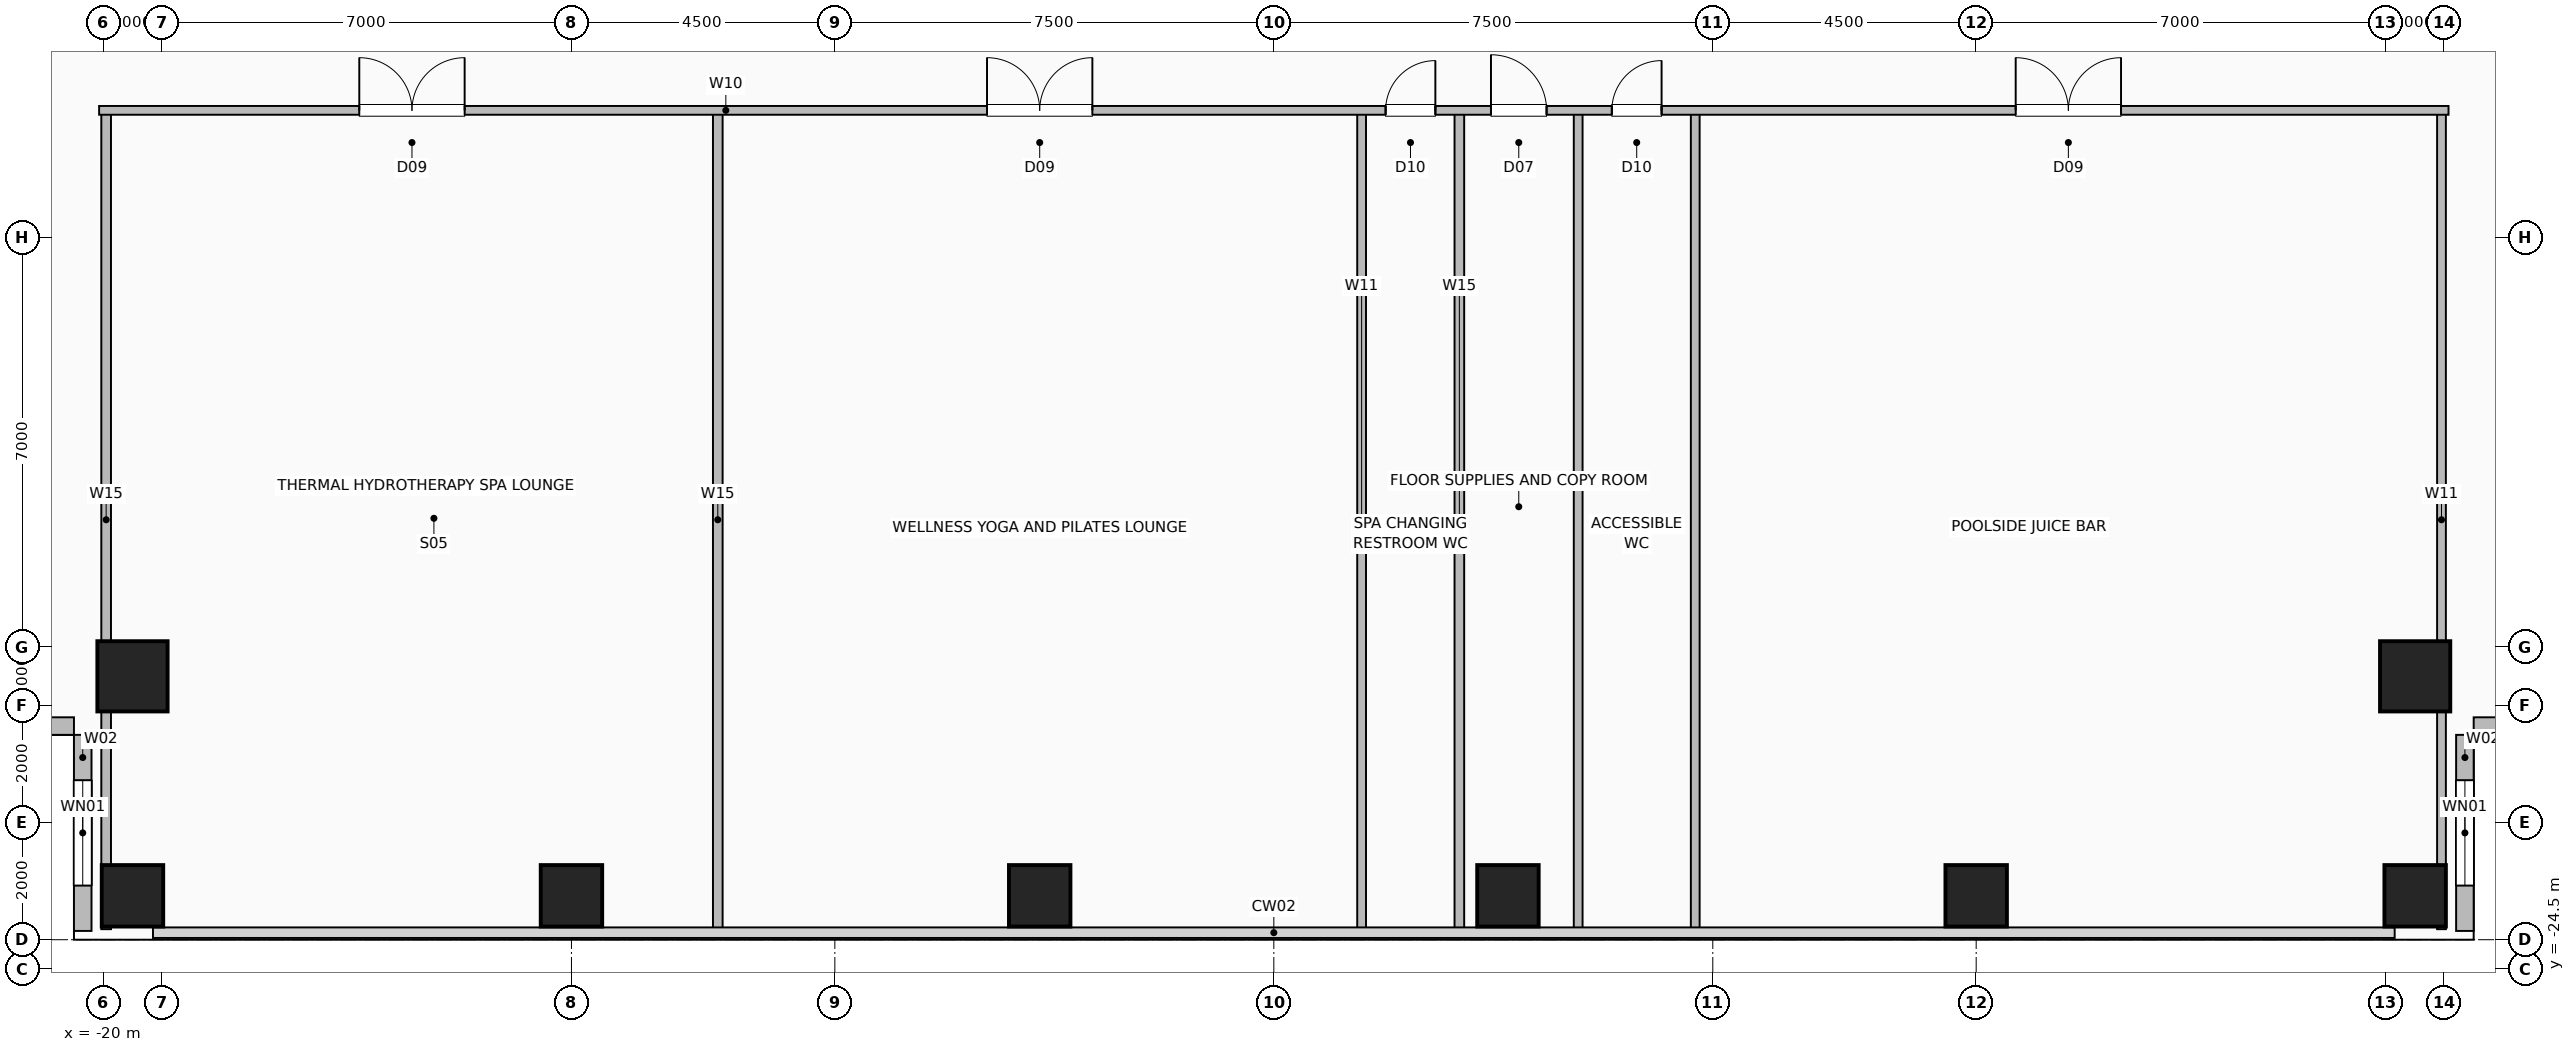
"""IFC4 building model, lengths in metres.
Left out: names, types, materials, properties, quantities, classifications, styles, units other than length and angle.
Written with IfcOpenShell. Run it as: python <this file> out.ifc"""

import sys

from ifc_helpers import new_model, si_unit, direction, frame, frame_2d, origin, origin_2d, place, context, subcontext, project, spatial, rectangle, hollow_rectangle, extrude, element, fill, save


model = new_model("IFC4")
c1 = context("Model", 3, precision=1e-05, world=origin(), true_north=direction((0.0, 1.0)))
c2 = subcontext(c1, "Body", "Model", "MODEL_VIEW")
j1 = project(units=[si_unit("LENGTHUNIT", "METRE"), si_unit("PLANEANGLEUNIT", "RADIAN")], contexts=[c1])
p1 = place(None, origin())
s1 = spatial("IfcSite", under=j1, at=p1, CompositionType="ELEMENT")
p2 = place(p1, origin())
s2 = spatial("IfcBuilding", under=s1, at=p2, CompositionType="ELEMENT")
p3 = place(p2, frame((0.0, 0.0, 51.5)))
s3 = spatial("IfcBuildingStorey", under=s2, at=p3, CompositionType="ELEMENT", Elevation=51.5)
for number, where, z_axis, x_axis in (
    (1, (-19.5, -23.25, 0.0), (0.0, 0.0, 1.0), (1.0, 0.0, 0.0)),
    (2, (-12.0, -23.25, 0.0), (0.0, 0.0, 1.0), (1.0, 0.0, 0.0)),
    (3, (-4.0, -23.25, 0.0), (0.0, 0.0, 1.0), (1.0, 0.0, 0.0)),
    (4, (4.0, -23.25, 0.0), (0.0, 0.0, 1.0), (1.0, 0.0, 0.0)),
    (5, (12.0, -23.25, 0.0), (0.0, 0.0, 1.0), (1.0, 0.0, 0.0)),
    (6, (19.5, -23.25, 0.0), (0.0, 0.0, 1.0), (1.0, 0.0, 0.0)),
):
    element("IfcColumn", number, at=place(p3, frame(where, z_axis=z_axis, x_axis=x_axis)), inside=s3, PredefinedType="COLUMN", context=c2, shape_type="SweptSolid", body=[
        extrude(hollow_rectangle(XDim=1.05, YDim=1.05, WallThickness=0.05, at=origin_2d()), origin(), (0.0, 0.0, 1.0), 3.5),
    ])
for number, where, z_axis, x_axis in (
    (7, (-19.5, -19.5, 0.0), (0.0, 0.0, 1.0), (1.0, 0.0, 0.0)),
    (8, (19.5, -19.5, 0.0), (0.0, 0.0, 1.0), (1.0, 0.0, 0.0)),
):
    element("IfcColumn", number, at=place(p3, frame(where, z_axis=z_axis, x_axis=x_axis)), inside=s3, PredefinedType="COLUMN", context=c2, shape_type="SweptSolid", body=[
        extrude(hollow_rectangle(XDim=1.2, YDim=1.2, WallThickness=0.055, at=origin_2d()), origin(), (0.0, 0.0, 1.0), 3.5),
    ])
p4 = place(p3, frame((-20.35, -23.85, 0.0), z_axis=(0.0, 0.0, 1.0), x_axis=(0.0, 1.0, 0.0)))
e9 = element("IfcWall", 9, at=p4, inside=s3, PredefinedType="SOLIDWALL", context=c2, shape_type="SweptSolid", body=[
    extrude(rectangle(XDim=3.35, YDim=0.3, at=frame_2d((1.675, 0.0))), origin(), (0.0, 0.0, 1.0), 3.25),
])
p5 = place(p4, frame((0.775, 0.0, 0.9)))
e10 = element("IfcOpeningElement", 10, at=p5, cuts=e9, PredefinedType="OPENING", context=c2, shape_type="SweptSolid", body=[
    extrude(rectangle(XDim=1.8, YDim=1.8, at=frame_2d((0.9, 0.9))), frame((0.0, 0.16, 0.0), z_axis=(0.0, -1.0, 0.0), x_axis=(1.0, 0.0, 0.0)), (0.0, 0.0, 1.0), 0.32),
])
p6 = place(p3, frame((-23.85, -20.35, 0.0), z_axis=(0.0, 0.0, 1.0), x_axis=(1.0, 0.0, 0.0)))
e11 = element("IfcWall", 11, at=p6, inside=s3, PredefinedType="SOLIDWALL", context=c2, shape_type="SweptSolid", body=[
    extrude(rectangle(XDim=3.35, YDim=0.3, at=frame_2d((1.675, 0.0))), origin(), (0.0, 0.0, 1.0), 3.25),
])
p7 = place(p3, frame((20.35, -23.85, 0.0), z_axis=(0.0, 0.0, 1.0), x_axis=(0.0, 1.0, 0.0)))
e12 = element("IfcWall", 12, at=p7, inside=s3, PredefinedType="SOLIDWALL", context=c2, shape_type="SweptSolid", body=[
    extrude(rectangle(XDim=3.35, YDim=0.3, at=frame_2d((1.675, 0.0))), origin(), (0.0, 0.0, 1.0), 3.25),
])
p8 = place(p7, frame((0.775, 0.0, 0.9)))
e13 = element("IfcOpeningElement", 13, at=p8, cuts=e12, PredefinedType="OPENING", context=c2, shape_type="SweptSolid", body=[
    extrude(rectangle(XDim=1.8, YDim=1.8, at=frame_2d((0.9, 0.9))), frame((0.0, 0.16, 0.0), z_axis=(0.0, -1.0, 0.0), x_axis=(1.0, 0.0, 0.0)), (0.0, 0.0, 1.0), 0.32),
])
p9 = place(p3, frame((23.85, -20.35, 0.0), z_axis=(0.0, 0.0, 1.0), x_axis=(-1.0, 0.0, 0.0)))
e14 = element("IfcWall", 14, at=p9, inside=s3, PredefinedType="SOLIDWALL", context=c2, shape_type="SweptSolid", body=[
    extrude(rectangle(XDim=3.35, YDim=0.3, at=frame_2d((1.675, 0.0))), origin(), (0.0, 0.0, 1.0), 3.25),
])
for number, where, z_axis, x_axis in (
    (15, (3.17, -23.82, 0.0), (0.0, 0.0, 1.0), (0.0, 1.0, 0.0)),
    (16, (-19.95, -23.82, 0.0), (0.0, 0.0, 1.0), (0.0, 1.0, 0.0)),
    (17, (-9.5, -23.82, 0.0), (0.0, 0.0, 1.0), (0.0, 1.0, 0.0)),
):
    element("IfcWall", number, at=place(p3, frame(where, z_axis=z_axis, x_axis=x_axis)), inside=s3, PredefinedType="PLUMBINGWALL", context=c2, shape_type="SweptSolid", body=[
        extrude(rectangle(XDim=13.99, YDim=0.165, at=frame_2d((6.995, 0.0))), origin(), (0.0, 0.0, 1.0), 3.25),
    ])
for number, where, z_axis, x_axis in (
    (18, (1.5, -23.82, 0.0), (0.0, 0.0, 1.0), (0.0, 1.0, 0.0)),
    (19, (5.2, -23.82, 0.0), (0.0, 0.0, 1.0), (0.0, 1.0, 0.0)),
    (20, (7.2, -23.82, 0.0), (0.0, 0.0, 1.0), (0.0, 1.0, 0.0)),
    (21, (19.95, -23.82, 0.0), (0.0, 0.0, 1.0), (0.0, 1.0, 0.0)),
):
    element("IfcWall", number, at=place(p3, frame(where, z_axis=z_axis, x_axis=x_axis)), inside=s3, PredefinedType="PARTITIONING", context=c2, shape_type="SweptSolid", body=[
        extrude(rectangle(XDim=13.99, YDim=0.15, at=frame_2d((6.995, 0.0))), origin(), (0.0, 0.0, 1.0), 3.25),
    ])
p10 = place(p3, frame((-20.07, -9.83, 0.0), z_axis=(0.0, 0.0, 1.0), x_axis=(1.0, 0.0, 0.0)))
e22 = element("IfcWall", 22, at=p10, inside=s3, PredefinedType="PARTITIONING", context=c2, shape_type="SweptSolid", body=[
    extrude(rectangle(XDim=40.14, YDim=0.15, at=frame_2d((20.07, 0.0))), origin(), (0.0, 0.0, 1.0), 3.25),
])
p11 = place(p10, frame((4.445, 0.0, 0.0)))
e23 = element("IfcOpeningElement", 23, at=p11, cuts=e22, PredefinedType="OPENING", context=c2, shape_type="SweptSolid", body=[
    extrude(rectangle(XDim=1.8, YDim=2.08, at=frame_2d((0.9, 1.04))), frame((0.0, 0.085, 0.0), z_axis=(0.0, -1.0, 0.0), x_axis=(1.0, 0.0, 0.0)), (0.0, 0.0, 1.0), 0.17),
])
p12 = place(p10, frame((15.17, 0.0, 0.0)))
e24 = element("IfcOpeningElement", 24, at=p12, cuts=e22, PredefinedType="OPENING", context=c2, shape_type="SweptSolid", body=[
    extrude(rectangle(XDim=1.8, YDim=2.08, at=frame_2d((0.9, 1.04))), frame((0.0, 0.085, 0.0), z_axis=(0.0, -1.0, 0.0), x_axis=(1.0, 0.0, 0.0)), (0.0, 0.0, 1.0), 0.17),
])
p13 = place(p10, frame((21.98, 0.0, 0.0)))
e25 = element("IfcOpeningElement", 25, at=p13, cuts=e22, PredefinedType="OPENING", context=c2, shape_type="SweptSolid", body=[
    extrude(rectangle(XDim=0.85, YDim=2.05, at=frame_2d((0.425, 1.025))), frame((0.0, 0.085, 0.0), z_axis=(0.0, -1.0, 0.0), x_axis=(1.0, 0.0, 0.0)), (0.0, 0.0, 1.0), 0.17),
])
p14 = place(p10, frame((23.78, 0.0, 0.0)))
e26 = element("IfcOpeningElement", 26, at=p14, cuts=e22, PredefinedType="OPENING", context=c2, shape_type="SweptSolid", body=[
    extrude(rectangle(XDim=0.95, YDim=2.06, at=frame_2d((0.475, 1.03))), frame((0.0, 0.085, 0.0), z_axis=(0.0, -1.0, 0.0), x_axis=(1.0, 0.0, 0.0)), (0.0, 0.0, 1.0), 0.17),
])
p15 = place(p10, frame((25.845, 0.0, 0.0)))
e27 = element("IfcOpeningElement", 27, at=p15, cuts=e22, PredefinedType="OPENING", context=c2, shape_type="SweptSolid", body=[
    extrude(rectangle(XDim=0.85, YDim=2.05, at=frame_2d((0.425, 1.025))), frame((0.0, 0.085, 0.0), z_axis=(0.0, -1.0, 0.0), x_axis=(1.0, 0.0, 0.0)), (0.0, 0.0, 1.0), 0.17),
])
p16 = place(p10, frame((32.745, 0.0, 0.0)))
e28 = element("IfcOpeningElement", 28, at=p16, cuts=e22, PredefinedType="OPENING", context=c2, shape_type="SweptSolid", body=[
    extrude(rectangle(XDim=1.8, YDim=2.08, at=frame_2d((0.9, 1.04))), frame((0.0, 0.085, 0.0), z_axis=(0.0, -1.0, 0.0), x_axis=(1.0, 0.0, 0.0)), (0.0, 0.0, 1.0), 0.17),
])
p17 = place(p5, origin())
e29 = element("IfcWindow", 29, at=p17, inside=s3, PartitioningType="SINGLE_PANEL", PredefinedType="WINDOW", context=c2, shape_type="SweptSolid", body=[
    extrude(rectangle(XDim=1.8, YDim=1.8, at=frame_2d((0.9, 0.9))), frame((0.0, 0.03, 0.0), z_axis=(0.0, -1.0, 0.0), x_axis=(1.0, 0.0, 0.0)), (0.0, 0.0, 1.0), 0.06),
])
fill(e10, e29)
p18 = place(p8, origin())
e30 = element("IfcWindow", 30, at=p18, inside=s3, PartitioningType="SINGLE_PANEL", PredefinedType="WINDOW", context=c2, shape_type="SweptSolid", body=[
    extrude(rectangle(XDim=1.8, YDim=1.8, at=frame_2d((0.9, 0.9))), frame((0.0, 0.03, 0.0), z_axis=(0.0, -1.0, 0.0), x_axis=(1.0, 0.0, 0.0)), (0.0, 0.0, 1.0), 0.06),
])
fill(e13, e30)
p19 = place(p11, origin())
e31 = element("IfcDoor", 31, at=p19, inside=s3, OperationType="DOUBLE_DOOR_SINGLE_SWING", PredefinedType="DOOR", context=c2, shape_type="SweptSolid", body=[
    extrude(rectangle(XDim=1.8, YDim=2.08, at=frame_2d((0.9, 1.04))), frame((0.0, 0.025, 0.0), z_axis=(0.0, -1.0, 0.0), x_axis=(1.0, 0.0, 0.0)), (0.0, 0.0, 1.0), 0.05),
])
fill(e23, e31)
p20 = place(p12, origin())
e32 = element("IfcDoor", 32, at=p20, inside=s3, OperationType="DOUBLE_DOOR_SINGLE_SWING", PredefinedType="DOOR", context=c2, shape_type="SweptSolid", body=[
    extrude(rectangle(XDim=1.8, YDim=2.08, at=frame_2d((0.9, 1.04))), frame((0.0, 0.025, 0.0), z_axis=(0.0, -1.0, 0.0), x_axis=(1.0, 0.0, 0.0)), (0.0, 0.0, 1.0), 0.05),
])
fill(e24, e32)
p21 = place(p13, origin())
e33 = element("IfcDoor", 33, at=p21, inside=s3, OperationType="SINGLE_SWING_RIGHT", PredefinedType="DOOR", context=c2, shape_type="SweptSolid", body=[
    extrude(rectangle(XDim=0.85, YDim=2.05, at=frame_2d((0.425, 1.025))), frame((0.0, 0.025, 0.0), z_axis=(0.0, -1.0, 0.0), x_axis=(1.0, 0.0, 0.0)), (0.0, 0.0, 1.0), 0.05),
])
fill(e25, e33)
p22 = place(p14, origin())
e34 = element("IfcDoor", 34, at=p22, inside=s3, OperationType="SINGLE_SWING_LEFT", PredefinedType="DOOR", context=c2, shape_type="SweptSolid", body=[
    extrude(rectangle(XDim=0.95, YDim=2.06, at=frame_2d((0.475, 1.03))), frame((0.0, 0.025, 0.0), z_axis=(0.0, -1.0, 0.0), x_axis=(1.0, 0.0, 0.0)), (0.0, 0.0, 1.0), 0.05),
])
fill(e26, e34)
p23 = place(p15, origin())
e35 = element("IfcDoor", 35, at=p23, inside=s3, OperationType="SINGLE_SWING_RIGHT", PredefinedType="DOOR", context=c2, shape_type="SweptSolid", body=[
    extrude(rectangle(XDim=0.85, YDim=2.05, at=frame_2d((0.425, 1.025))), frame((0.0, 0.025, 0.0), z_axis=(0.0, -1.0, 0.0), x_axis=(1.0, 0.0, 0.0)), (0.0, 0.0, 1.0), 0.05),
])
fill(e27, e35)
p24 = place(p16, origin())
e36 = element("IfcDoor", 36, at=p24, inside=s3, OperationType="DOUBLE_DOOR_SINGLE_SWING", PredefinedType="DOOR", context=c2, shape_type="SweptSolid", body=[
    extrude(rectangle(XDim=1.8, YDim=2.08, at=frame_2d((0.9, 1.04))), frame((0.0, 0.025, 0.0), z_axis=(0.0, -1.0, 0.0), x_axis=(1.0, 0.0, 0.0)), (0.0, 0.0, 1.0), 0.05),
])
fill(e28, e36)
save(model, sys.argv[1])
